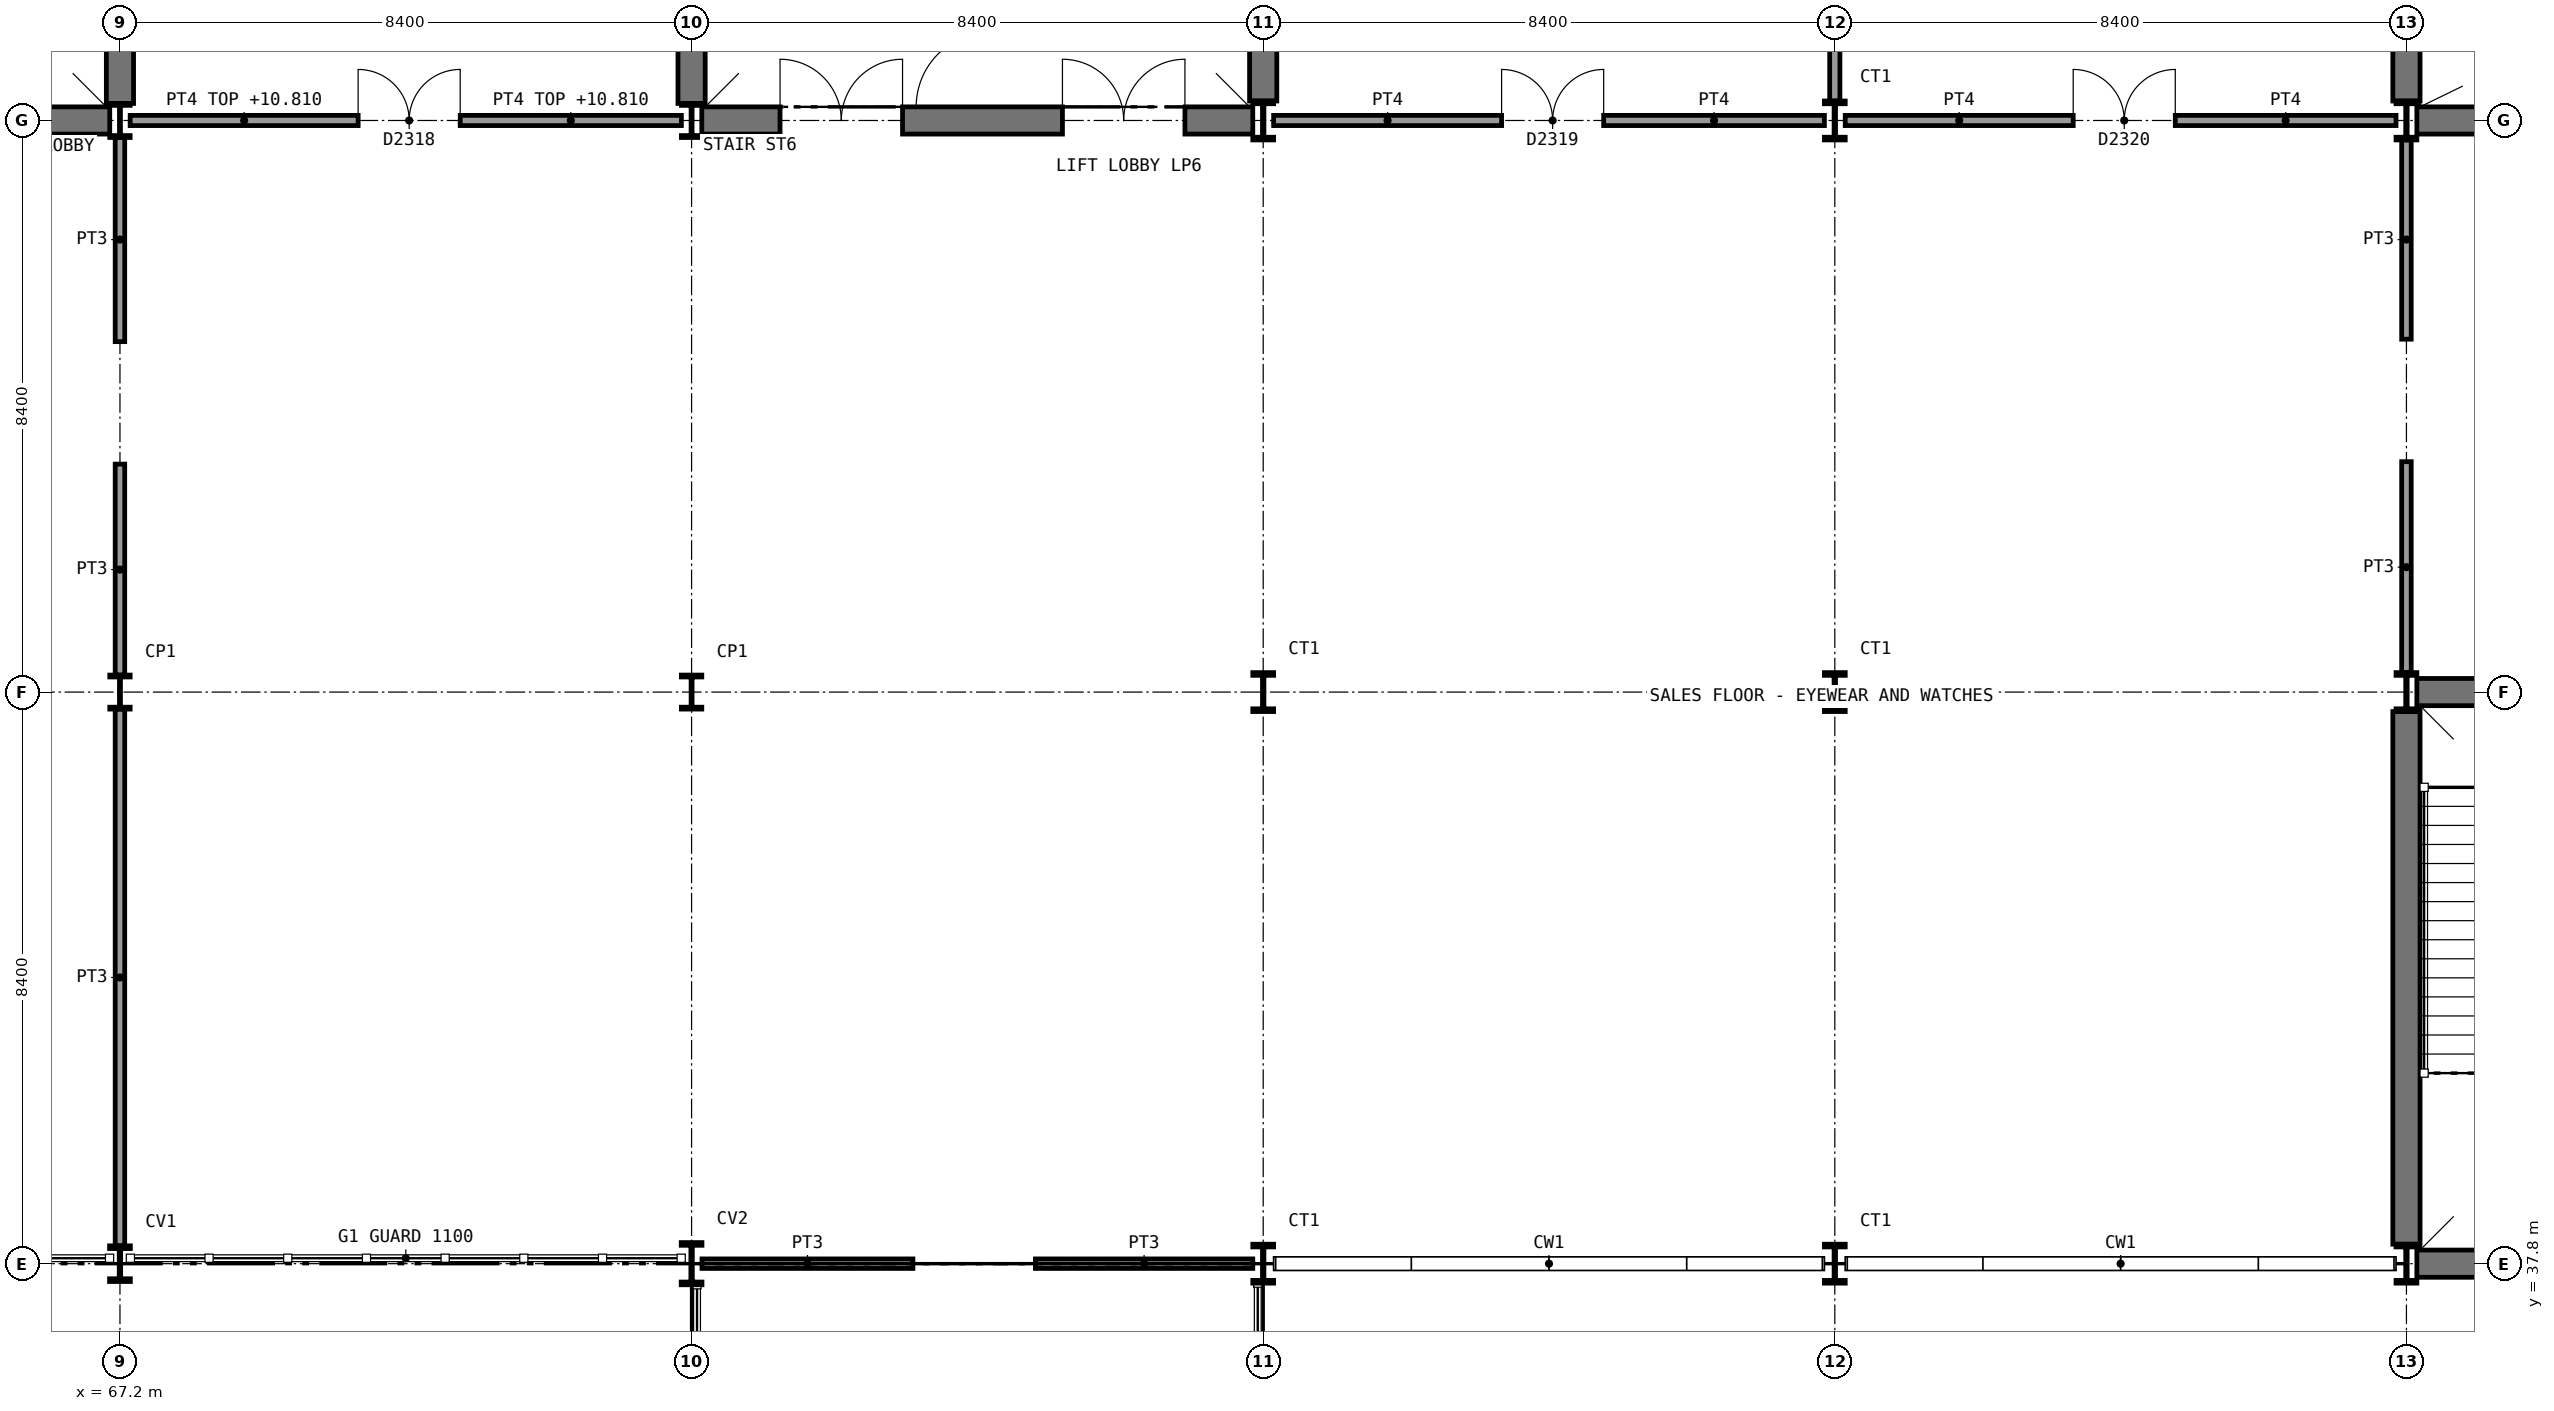
"""IFC4 building model, lengths in metres.
Left out: names, types, materials, properties, quantities, classifications, styles, units other than length and angle.
Written with IfcOpenShell. Run it as: python <this file> out.ifc"""

import sys

from ifc_helpers import new_model, si_unit, direction, frame, frame_2d, origin, origin_2d, place, context, subcontext, project, spatial, rectangle, i_section, extrude, element, fill, save


model = new_model("IFC4")
c1 = context("Model", 3, precision=1e-05, world=origin(), true_north=direction((0.0, 1.0)))
c2 = subcontext(c1, "Body", "Model", "MODEL_VIEW")
j1 = project(units=[si_unit("LENGTHUNIT", "METRE"), si_unit("PLANEANGLEUNIT", "RADIAN")], contexts=[c1])
p1 = place(None, origin())
s1 = spatial("IfcSite", under=j1, at=p1, CompositionType="ELEMENT")
p2 = place(p1, origin())
s2 = spatial("IfcBuilding", under=s1, at=p2, CompositionType="ELEMENT")
p3 = place(p2, frame((0.0, 0.0, 6.0)))
s3 = spatial("IfcBuildingStorey", under=s2, at=p3, CompositionType="ELEMENT", Elevation=6.0)
p4 = place(p3, frame((75.75, 54.6, 0.0), z_axis=(0.0, 0.0, 1.0), x_axis=(1.0, 0.0, 0.0)))
e1 = element("IfcWall", 1, at=p4, inside=s3, PredefinedType="SHEAR", context=c2, shape_type="SweptSolid", body=[
    extrude(rectangle(XDim=8.097, YDim=0.4, at=frame_2d((4.048, 0.0))), origin(), (0.0, 0.0, 1.0), 5.25),
])
p5 = place(p4, frame((1.15, 0.0, 0.0)))
e2 = element("IfcOpeningElement", 2, at=p5, cuts=e1, PredefinedType="OPENING", context=c2, shape_type="SweptSolid", body=[
    extrude(rectangle(XDim=1.8, YDim=2.1, at=frame_2d((0.9, 1.05))), frame((0.0, 0.21, 0.0), z_axis=(0.0, -1.0, 0.0), x_axis=(1.0, 0.0, 0.0)), (0.0, 0.0, 1.0), 0.42),
])
p6 = place(p4, frame((5.3, 0.0, 0.0)))
e3 = element("IfcOpeningElement", 3, at=p6, cuts=e1, PredefinedType="OPENING", context=c2, shape_type="SweptSolid", body=[
    extrude(rectangle(XDim=1.8, YDim=2.1, at=frame_2d((0.9, 1.05))), frame((0.0, 0.21, 0.0), z_axis=(0.0, -1.0, 0.0), x_axis=(1.0, 0.0, 0.0)), (0.0, 0.0, 1.0), 0.42),
])
p7 = place(p3, frame((75.6, 54.85, 0.0), z_axis=(0.0, 0.0, 1.0), x_axis=(0.0, 1.0, 0.0)))
e4 = element("IfcWall", 4, at=p7, inside=s3, PredefinedType="SHEAR", context=c2, shape_type="SweptSolid", body=[
    extrude(rectangle(XDim=7.9, YDim=0.4, at=frame_2d((3.95, 0.0))), origin(), (0.0, 0.0, 1.0), 5.25),
])
p8 = place(p3, frame((84.0, 54.886, 0.0), z_axis=(0.0, 0.0, 1.0), x_axis=(0.0, 1.0, 0.0)))
e5 = element("IfcWall", 5, at=p8, inside=s3, PredefinedType="SHEAR", context=c2, shape_type="SweptSolid", body=[
    extrude(rectangle(XDim=7.828, YDim=0.4, at=frame_2d((3.914, 0.0))), origin(), (0.0, 0.0, 1.0), 5.25),
])
p9 = place(p3, frame((58.95, 54.6, 0.0), z_axis=(0.0, 0.0, 1.0), x_axis=(1.0, 0.0, 0.0)))
e6 = element("IfcWall", 6, at=p9, inside=s3, PredefinedType="SHEAR", context=c2, shape_type="SweptSolid", body=[
    extrude(rectangle(XDim=8.1, YDim=0.4, at=frame_2d((4.05, 0.0))), origin(), (0.0, 0.0, 1.0), 5.25),
])
p10 = place(p9, frame((1.15, 0.0, 0.0)))
e7 = element("IfcOpeningElement", 7, at=p10, cuts=e6, PredefinedType="OPENING", context=c2, shape_type="SweptSolid", body=[
    extrude(rectangle(XDim=1.8, YDim=2.1, at=frame_2d((0.9, 1.05))), frame((0.0, 0.21, 0.0), z_axis=(0.0, -1.0, 0.0), x_axis=(1.0, 0.0, 0.0)), (0.0, 0.0, 1.0), 0.42),
])
p11 = place(p9, frame((5.6, 0.0, 0.0)))
e8 = element("IfcOpeningElement", 8, at=p11, cuts=e6, PredefinedType="OPENING", context=c2, shape_type="SweptSolid", body=[
    extrude(rectangle(XDim=1.2, YDim=2.1, at=frame_2d((0.6, 1.05))), frame((0.0, 0.21, 0.0), z_axis=(0.0, -1.0, 0.0), x_axis=(1.0, 0.0, 0.0)), (0.0, 0.0, 1.0), 0.42),
])
p12 = place(p3, frame((67.2, 54.85, 0.0), z_axis=(0.0, 0.0, 1.0), x_axis=(0.0, 1.0, 0.0)))
e9 = element("IfcWall", 9, at=p12, inside=s3, PredefinedType="SHEAR", context=c2, shape_type="SweptSolid", body=[
    extrude(rectangle(XDim=7.9, YDim=0.4, at=frame_2d((3.95, 0.0))), origin(), (0.0, 0.0, 1.0), 5.25),
])
p13 = place(p3, frame((100.953, 54.6, 0.0), z_axis=(0.0, 0.0, 1.0), x_axis=(1.0, 0.0, 0.0)))
e10 = element("IfcWall", 10, at=p13, inside=s3, PredefinedType="SHEAR", context=c2, shape_type="SweptSolid", body=[
    extrude(rectangle(XDim=16.361, YDim=0.4, at=frame_2d((8.181, 0.0))), origin(), (0.0, 0.0, 1.0), 5.25),
])
p14 = place(p13, frame((7.047, 0.0, 0.0)))
e11 = element("IfcOpeningElement", 11, at=p14, cuts=e10, PredefinedType="OPENING", context=c2, shape_type="SweptSolid", body=[
    extrude(rectangle(XDim=2.4, YDim=2.4, at=frame_2d((1.2, 1.2))), frame((0.0, 0.21, 0.0), z_axis=(0.0, -1.0, 0.0), x_axis=(1.0, 0.0, 0.0)), (0.0, 0.0, 1.0), 0.42),
])
p15 = place(p3, frame((100.8, 54.886, 0.0), z_axis=(0.0, 0.0, 1.0), x_axis=(0.0, 1.0, 0.0)))
e12 = element("IfcWall", 12, at=p15, inside=s3, PredefinedType="SHEAR", context=c2, shape_type="SweptSolid", body=[
    extrude(rectangle(XDim=7.828, YDim=0.4, at=frame_2d((3.914, 0.0))), origin(), (0.0, 0.0, 1.0), 5.25),
])
for number, where, z_axis, x_axis in (
    (13, (100.953, 37.8, 0.0), (0.0, 0.0, 1.0), (1.0, 0.0, 0.0)),
    (14, (100.953, 46.2, 0.0), (0.0, 0.0, 1.0), (1.0, 0.0, 0.0)),
):
    element("IfcWall", number, at=place(p3, frame(where, z_axis=z_axis, x_axis=x_axis)), inside=s3, PredefinedType="SHEAR", context=c2, shape_type="SweptSolid", body=[
        extrude(rectangle(XDim=8.094, YDim=0.4, at=frame_2d((4.047, 0.0))), origin(), (0.0, 0.0, 1.0), 5.25),
    ])
p16 = place(p3, frame((100.8, 38.086, 0.0), z_axis=(0.0, 0.0, 1.0), x_axis=(0.0, 1.0, 0.0)))
e15 = element("IfcWall", 15, at=p16, inside=s3, PredefinedType="SHEAR", context=c2, shape_type="SweptSolid", body=[
    extrude(rectangle(XDim=7.828, YDim=0.4, at=frame_2d((3.914, 0.0))), origin(), (0.0, 0.0, 1.0), 5.25),
])
p17 = place(p3, frame((67.2, 37.8, 0.0), z_axis=(0.0, 0.0, 1.0), x_axis=(1.0, 0.0, 0.0)))
e16 = element("IfcColumn", 16, at=p17, inside=s3, PredefinedType="COLUMN", context=c2, shape_type="SweptSolid", body=[
    extrude(i_section(OverallWidth=0.306, OverallDepth=0.524, WebThickness=0.021, FlangeThickness=0.04, FilletRadius=0.027, at=origin_2d()), origin(), (0.0, 0.0, 1.0), 5.4),
])
for number, where, z_axis, x_axis in (
    (17, (67.2, 46.2, 0.0), (0.0, 0.0, 1.0), (1.0, 0.0, 0.0)),
    (18, (67.2, 54.6, 0.0), (0.0, 0.0, 1.0), (1.0, 0.0, 0.0)),
):
    element("IfcColumn", number, at=place(p3, frame(where, z_axis=z_axis, x_axis=x_axis)), inside=s3, PredefinedType="COLUMN", context=c2, shape_type="SweptSolid", body=[
        extrude(i_section(OverallWidth=0.3, OverallDepth=0.5, WebThickness=0.014, FlangeThickness=0.028, FilletRadius=0.027, at=origin_2d()), origin(), (0.0, 0.0, 1.0), 5.4),
    ])
p18 = place(p3, frame((75.6, 37.8, 0.0), z_axis=(0.0, 0.0, 1.0), x_axis=(1.0, 0.0, 0.0)))
e19 = element("IfcColumn", 19, at=p18, inside=s3, PredefinedType="COLUMN", context=c2, shape_type="SweptSolid", body=[
    extrude(i_section(OverallWidth=0.305, OverallDepth=0.62, WebThickness=0.021, FlangeThickness=0.04, FilletRadius=0.027, at=origin_2d()), origin(), (0.0, 0.0, 1.0), 5.4),
])
for number, where, z_axis, x_axis in (
    (20, (75.6, 46.2, 0.0), (0.0, 0.0, 1.0), (1.0, 0.0, 0.0)),
    (21, (75.6, 54.6, 0.0), (0.0, 0.0, 1.0), (1.0, 0.0, 0.0)),
):
    element("IfcColumn", number, at=place(p3, frame(where, z_axis=z_axis, x_axis=x_axis)), inside=s3, PredefinedType="COLUMN", context=c2, shape_type="SweptSolid", body=[
        extrude(i_section(OverallWidth=0.3, OverallDepth=0.5, WebThickness=0.014, FlangeThickness=0.028, FilletRadius=0.027, at=origin_2d()), origin(), (0.0, 0.0, 1.0), 5.4),
    ])
for number, where, z_axis, x_axis in (
    (22, (84.0, 37.8, 0.0), (0.0, 0.0, 1.0), (1.0, 0.0, 0.0)),
    (23, (84.0, 46.2, 0.0), (0.0, 0.0, 1.0), (1.0, 0.0, 0.0)),
    (24, (84.0, 54.6, 0.0), (0.0, 0.0, 1.0), (1.0, 0.0, 0.0)),
    (25, (92.4, 37.8, 0.0), (0.0, 0.0, 1.0), (1.0, 0.0, 0.0)),
    (26, (92.4, 46.2, 0.0), (0.0, 0.0, 1.0), (1.0, 0.0, 0.0)),
    (27, (92.4, 54.6, 0.0), (0.0, 0.0, 1.0), (1.0, 0.0, 0.0)),
    (28, (100.8, 37.8, 0.0), (0.0, 0.0, 1.0), (1.0, 0.0, 0.0)),
    (29, (100.8, 46.2, 0.0), (0.0, 0.0, 1.0), (1.0, 0.0, 0.0)),
    (30, (100.8, 54.6, 0.0), (0.0, 0.0, 1.0), (1.0, 0.0, 0.0)),
):
    element("IfcColumn", number, at=place(p3, frame(where, z_axis=z_axis, x_axis=x_axis)), inside=s3, PredefinedType="COLUMN", context=c2, shape_type="SweptSolid", body=[
        extrude(i_section(OverallWidth=0.306, OverallDepth=0.572, WebThickness=0.021, FlangeThickness=0.04, FilletRadius=0.027, at=origin_2d()), origin(), (0.0, 0.0, 1.0), 5.4),
    ])
p19 = place(p3, frame((67.35, 54.6, 0.0), z_axis=(0.0, 0.0, 1.0), x_axis=(1.0, 0.0, 0.0)))
e31 = element("IfcWall", 31, at=p19, inside=s3, PredefinedType="SOLIDWALL", context=c2, shape_type="SweptSolid", body=[
    extrude(rectangle(XDim=8.1, YDim=0.15, at=frame_2d((4.05, 0.0))), origin(), (0.0, 0.0, 1.0), 4.81),
])
p20 = place(p19, frame((3.35, 0.0, 0.0)))
e32 = element("IfcOpeningElement", 32, at=p20, cuts=e31, PredefinedType="OPENING", context=c2, shape_type="SweptSolid", body=[
    extrude(rectangle(XDim=1.5, YDim=2.1, at=frame_2d((0.75, 1.05))), frame((0.0, 0.085, 0.0), z_axis=(0.0, -1.0, 0.0), x_axis=(1.0, 0.0, 0.0)), (0.0, 0.0, 1.0), 0.17),
])
p21 = place(p3, frame((92.4, 54.886, 0.0), z_axis=(0.0, 0.0, 1.0), x_axis=(0.0, 1.0, 0.0)))
e33 = element("IfcWall", 33, at=p21, inside=s3, PredefinedType="SOLIDWALL", context=c2, shape_type="SweptSolid", body=[
    extrude(rectangle(XDim=7.828, YDim=0.15, at=frame_2d((3.914, 0.0))), origin(), (0.0, 0.0, 1.0), 4.81),
])
p22 = place(p3, frame((84.153, 54.6, 0.0), z_axis=(0.0, 0.0, 1.0), x_axis=(1.0, 0.0, 0.0)))
e34 = element("IfcWall", 34, at=p22, inside=s3, PredefinedType="SOLIDWALL", context=c2, shape_type="SweptSolid", body=[
    extrude(rectangle(XDim=8.094, YDim=0.15, at=frame_2d((4.047, 0.0))), origin(), (0.0, 0.0, 1.0), 4.92),
])
p23 = place(p22, frame((3.35, 0.0, 0.0)))
e35 = element("IfcOpeningElement", 35, at=p23, cuts=e34, PredefinedType="OPENING", context=c2, shape_type="SweptSolid", body=[
    extrude(rectangle(XDim=1.5, YDim=2.1, at=frame_2d((0.75, 1.05))), frame((0.0, 0.085, 0.0), z_axis=(0.0, -1.0, 0.0), x_axis=(1.0, 0.0, 0.0)), (0.0, 0.0, 1.0), 0.17),
])
p24 = place(p3, frame((92.553, 54.6, 0.0), z_axis=(0.0, 0.0, 1.0), x_axis=(1.0, 0.0, 0.0)))
e36 = element("IfcWall", 36, at=p24, inside=s3, PredefinedType="SOLIDWALL", context=c2, shape_type="SweptSolid", body=[
    extrude(rectangle(XDim=8.094, YDim=0.15, at=frame_2d((4.047, 0.0))), origin(), (0.0, 0.0, 1.0), 4.92),
])
p25 = place(p24, frame((3.35, 0.0, 0.0)))
e37 = element("IfcOpeningElement", 37, at=p25, cuts=e36, PredefinedType="OPENING", context=c2, shape_type="SweptSolid", body=[
    extrude(rectangle(XDim=1.5, YDim=2.1, at=frame_2d((0.75, 1.05))), frame((0.0, 0.085, 0.0), z_axis=(0.0, -1.0, 0.0), x_axis=(1.0, 0.0, 0.0)), (0.0, 0.0, 1.0), 0.17),
])
p26 = place(p3, frame((67.2, 38.062, 0.0), z_axis=(0.0, 0.0, 1.0), x_axis=(0.0, 1.0, 0.0)))
e38 = element("IfcWall", 38, at=p26, inside=s3, PredefinedType="PARTITIONING", context=c2, shape_type="SweptSolid", body=[
    extrude(rectangle(XDim=7.888, YDim=0.14, at=frame_2d((3.944, 0.0))), origin(), (0.0, 0.0, 1.0), 4.81),
])
p27 = place(p3, frame((67.2, 46.45, 0.0), z_axis=(0.0, 0.0, 1.0), x_axis=(0.0, 1.0, 0.0)))
e39 = element("IfcWall", 39, at=p27, inside=s3, PredefinedType="PARTITIONING", context=c2, shape_type="SweptSolid", body=[
    extrude(rectangle(XDim=3.1, YDim=0.14, at=frame_2d((1.55, 0.0))), origin(), (0.0, 0.0, 1.0), 4.81),
])
p28 = place(p3, frame((67.2, 51.35, 0.0), z_axis=(0.0, 0.0, 1.0), x_axis=(0.0, 1.0, 0.0)))
e40 = element("IfcWall", 40, at=p28, inside=s3, PredefinedType="PARTITIONING", context=c2, shape_type="SweptSolid", body=[
    extrude(rectangle(XDim=3.0, YDim=0.14, at=frame_2d((1.5, 0.0))), origin(), (0.0, 0.0, 1.0), 4.81),
])
p29 = place(p3, frame((100.8, 46.486, 0.0), z_axis=(0.0, 0.0, 1.0), x_axis=(0.0, 1.0, 0.0)))
e41 = element("IfcWall", 41, at=p29, inside=s3, PredefinedType="PARTITIONING", context=c2, shape_type="SweptSolid", body=[
    extrude(rectangle(XDim=3.1, YDim=0.14, at=frame_2d((1.55, 0.0))), origin(), (0.0, 0.0, 1.0), 4.81),
])
p30 = place(p3, frame((100.8, 51.386, 0.0), z_axis=(0.0, 0.0, 1.0), x_axis=(0.0, 1.0, 0.0)))
e42 = element("IfcWall", 42, at=p30, inside=s3, PredefinedType="PARTITIONING", context=c2, shape_type="SweptSolid", body=[
    extrude(rectangle(XDim=2.928, YDim=0.14, at=frame_2d((1.464, 0.0))), origin(), (0.0, 0.0, 1.0), 4.81),
])
p31 = place(p3, frame((75.753, 37.8, 0.0), z_axis=(0.0, 0.0, 1.0), x_axis=(1.0, 0.0, 0.0)))
e43 = element("IfcWall", 43, at=p31, inside=s3, PredefinedType="PARTITIONING", context=c2, shape_type="SweptSolid", body=[
    extrude(rectangle(XDim=3.1, YDim=0.14, at=frame_2d((1.55, 0.0))), origin(), (0.0, 0.0, 1.0), 4.81),
])
p32 = place(p3, frame((80.653, 37.8, 0.0), z_axis=(0.0, 0.0, 1.0), x_axis=(1.0, 0.0, 0.0)))
e44 = element("IfcWall", 44, at=p32, inside=s3, PredefinedType="PARTITIONING", context=c2, shape_type="SweptSolid", body=[
    extrude(rectangle(XDim=3.194, YDim=0.14, at=frame_2d((1.597, 0.0))), origin(), (0.0, 0.0, 1.0), 4.81),
])
p33 = place(p3, frame((80.0, 62.8, 0.0), z_axis=(0.0, 0.0, 1.0), x_axis=(0.0, -1.0, 0.0)))
e45 = element("IfcWall", 45, at=p33, inside=s3, PredefinedType="SHEAR", context=c2, shape_type="SweptSolid", body=[
    extrude(rectangle(XDim=8.0, YDim=0.2, at=frame_2d((4.0, 0.0))), origin(), (0.0, 0.0, 1.0), 5.25),
])
p34 = place(p33, frame((6.9, 0.0, 0.0)))
e46 = element("IfcOpeningElement", 46, at=p34, cuts=e45, PredefinedType="OPENING", context=c2, shape_type="SweptSolid", body=[
    extrude(rectangle(XDim=1.11, YDim=2.1, at=frame_2d((0.555, 1.05))), frame((0.0, 0.11, 0.0), z_axis=(0.0, -1.0, 0.0), x_axis=(1.0, 0.0, 0.0)), (0.0, 0.0, 1.0), 0.22),
])
p35 = place(p20, origin())
e47 = element("IfcDoor", 47, at=p35, inside=s3, OperationType="DOUBLE_DOOR_SINGLE_SWING", PredefinedType="DOOR", context=c2, shape_type="SweptSolid", body=[
    extrude(rectangle(XDim=1.5, YDim=2.1, at=frame_2d((0.75, 1.05))), frame((0.0, 0.025, 0.0), z_axis=(0.0, -1.0, 0.0), x_axis=(1.0, 0.0, 0.0)), (0.0, 0.0, 1.0), 0.05),
])
fill(e32, e47)
p36 = place(p23, origin())
e48 = element("IfcDoor", 48, at=p36, inside=s3, OperationType="DOUBLE_DOOR_SINGLE_SWING", PredefinedType="DOOR", context=c2, shape_type="SweptSolid", body=[
    extrude(rectangle(XDim=1.5, YDim=2.1, at=frame_2d((0.75, 1.05))), frame((0.0, 0.025, 0.0), z_axis=(0.0, -1.0, 0.0), x_axis=(1.0, 0.0, 0.0)), (0.0, 0.0, 1.0), 0.05),
])
fill(e35, e48)
p37 = place(p25, origin())
e49 = element("IfcDoor", 49, at=p37, inside=s3, OperationType="DOUBLE_DOOR_SINGLE_SWING", PredefinedType="DOOR", context=c2, shape_type="SweptSolid", body=[
    extrude(rectangle(XDim=1.5, YDim=2.1, at=frame_2d((0.75, 1.05))), frame((0.0, 0.025, 0.0), z_axis=(0.0, -1.0, 0.0), x_axis=(1.0, 0.0, 0.0)), (0.0, 0.0, 1.0), 0.05),
])
fill(e37, e49)
p38 = place(p34, frame((1.1, 0.0, 0.0), z_axis=(0.0, 0.0, 1.0), x_axis=(-1.0, 0.0, 0.0)))
e50 = element("IfcDoor", 50, at=p38, inside=s3, OperationType="SINGLE_SWING_LEFT", PredefinedType="DOOR", context=c2, shape_type="SweptSolid", body=[
    extrude(rectangle(XDim=1.1, YDim=2.1, at=frame_2d((0.55, 1.05))), frame((0.0, 0.025, 0.0), z_axis=(0.0, -1.0, 0.0), x_axis=(1.0, 0.0, 0.0)), (0.0, 0.0, 1.0), 0.05),
])
fill(e46, e50)
p39 = place(p5, origin())
e51 = element("IfcDoor", 51, at=p39, inside=s3, OperationType="DOUBLE_DOOR_SINGLE_SWING", PredefinedType="DOOR", context=c2, shape_type="SweptSolid", body=[
    extrude(rectangle(XDim=1.8, YDim=2.1, at=frame_2d((0.9, 1.05))), frame((0.0, 0.025, 0.0), z_axis=(0.0, -1.0, 0.0), x_axis=(1.0, 0.0, 0.0)), (0.0, 0.0, 1.0), 0.05),
])
fill(e2, e51)
p40 = place(p6, origin())
e52 = element("IfcDoor", 52, at=p40, inside=s3, OperationType="DOUBLE_DOOR_SINGLE_SWING", PredefinedType="DOOR", context=c2, shape_type="SweptSolid", body=[
    extrude(rectangle(XDim=1.8, YDim=2.1, at=frame_2d((0.9, 1.05))), frame((0.0, 0.025, 0.0), z_axis=(0.0, -1.0, 0.0), x_axis=(1.0, 0.0, 0.0)), (0.0, 0.0, 1.0), 0.05),
])
fill(e3, e52)
save(model, sys.argv[1])
